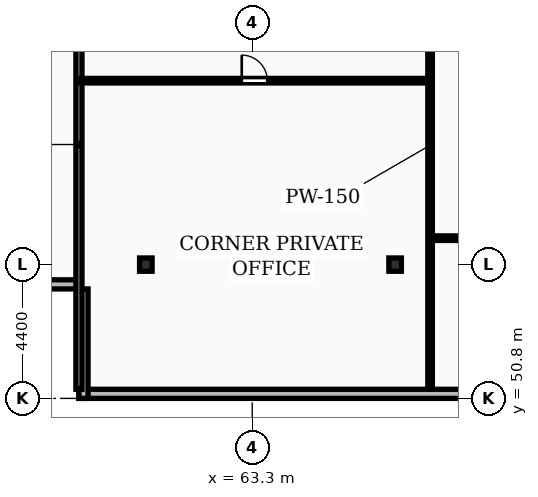
"""IFC4 building model, lengths in metres.
Left out: names, types, materials, properties, quantities, classifications, styles, units other than length and angle.
Written with IfcOpenShell. Run it as: python <this file> out.ifc"""

import sys

from ifc_helpers import new_model, si_unit, direction, frame, frame_2d, origin, origin_2d, place, context, subcontext, project, spatial, rectangle, i_section, extrude, element, fill, save


model = new_model("IFC4")
c1 = context("Model", 3, precision=1e-05, world=origin(), true_north=direction((0.0, 1.0)))
c2 = subcontext(c1, "Body", "Model", "MODEL_VIEW")
j1 = project(units=[si_unit("LENGTHUNIT", "METRE"), si_unit("PLANEANGLEUNIT", "RADIAN")], contexts=[c1])
p1 = place(None, origin())
s1 = spatial("IfcSite", under=j1, at=p1, CompositionType="ELEMENT")
p2 = place(p1, origin())
s2 = spatial("IfcBuilding", under=s1, at=p2, CompositionType="ELEMENT")
p3 = place(p2, frame((0.0, 0.0, 139.3)))
s3 = spatial("IfcBuildingStorey", under=s2, at=p3, CompositionType="ELEMENT", Elevation=139.3)
for number, where, z_axis, x_axis in (
    (1, (59.8, 55.2, 0.0), (0.0, 0.0, 1.0), (1.0, 0.0, 0.0)),
    (2, (68.0, 55.2, 0.0), (0.0, 0.0, 1.0), (1.0, 0.0, 0.0)),
):
    element("IfcColumn", number, at=place(p3, frame(where, z_axis=z_axis, x_axis=x_axis)), inside=s3, PredefinedType="COLUMN", context=c2, shape_type="SweptSolid", body=[
        extrude(i_section(OverallWidth=0.412, OverallDepth=0.437, WebThickness=0.036, FlangeThickness=0.052, FilletRadius=0.015, at=origin_2d()), origin(), (0.0, 0.0, 1.0), 3.6),
    ])
p4 = place(p3, frame((57.6, 50.95, 0.0), z_axis=(0.0, 0.0, 1.0), x_axis=(1.0, 0.0, 0.0)))
e3 = element("IfcWall", 3, at=p4, inside=s3, PredefinedType="STANDARD", context=c2, shape_type="SweptSolid", body=[
    extrude(rectangle(XDim=73.0, YDim=0.3, at=frame_2d((36.5, 0.0))), origin(), (0.0, 0.0, 1.0), 3.31),
])
p5 = place(p4, frame((15.225, 0.0, 0.85)))
e4 = element("IfcOpeningElement", 4, at=p5, cuts=e3, PredefinedType="OPENING", context=c2, shape_type="SweptSolid", body=[
    extrude(rectangle(XDim=1.8, YDim=1.8, at=frame_2d((0.9, 0.9))), frame((0.0, 0.16, 0.0), z_axis=(0.0, -1.0, 0.0), x_axis=(1.0, 0.0, 0.0)), (0.0, 0.0, 1.0), 0.32),
])
p6 = place(p4, frame((58.575, 0.0, 0.85)))
e5 = element("IfcOpeningElement", 5, at=p6, cuts=e3, PredefinedType="OPENING", context=c2, shape_type="SweptSolid", body=[
    extrude(rectangle(XDim=1.8, YDim=1.8, at=frame_2d((0.9, 0.9))), frame((0.0, 0.16, 0.0), z_axis=(0.0, -1.0, 0.0), x_axis=(1.0, 0.0, 0.0)), (0.0, 0.0, 1.0), 0.32),
])
p7 = place(p4, frame((33.45, 0.0, 0.0)))
e6 = element("IfcOpeningElement", 6, at=p7, cuts=e3, PredefinedType="OPENING", context=c2, shape_type="SweptSolid", body=[
    extrude(rectangle(XDim=1.1, YDim=2.1, at=frame_2d((0.55, 1.05))), frame((0.0, 0.16, 0.0), z_axis=(0.0, -1.0, 0.0), x_axis=(1.0, 0.0, 0.0)), (0.0, 0.0, 1.0), 0.32),
])
p8 = place(p3, frame((54.0, 54.55, 0.0), z_axis=(0.0, 0.0, 1.0), x_axis=(1.0, 0.0, 0.0)))
e7 = element("IfcWall", 7, at=p8, inside=s3, PredefinedType="STANDARD", context=c2, shape_type="SweptSolid", body=[
    extrude(rectangle(XDim=3.6, YDim=0.3, at=frame_2d((1.8, 0.0))), origin(), (0.0, 0.0, 1.0), 3.31),
])
p9 = place(p3, frame((57.75, 54.4, 0.0), z_axis=(0.0, 0.0, 1.0), x_axis=(0.0, -1.0, 0.0)))
e8 = element("IfcWall", 8, at=p9, inside=s3, PredefinedType="STANDARD", context=c2, shape_type="SweptSolid", body=[
    extrude(rectangle(XDim=3.6, YDim=0.3, at=frame_2d((1.8, 0.0))), origin(), (0.0, 0.0, 1.0), 3.31),
])
p10 = place(p3, frame((57.6, 51.1, 0.0), z_axis=(0.0, 0.0, 1.0), x_axis=(0.0, 1.0, 0.0)))
e9 = element("IfcWall", 9, at=p10, inside=s3, PredefinedType="PARTITIONING", context=c2, shape_type="SweptSolid", body=[
    extrude(rectangle(XDim=16.1, YDim=0.2, at=frame_2d((8.05, 0.0))), origin(), (0.0, 0.0, 1.0), 3.31),
])
p11 = place(p3, frame((57.6, 61.25, 0.0), z_axis=(0.0, 0.0, 1.0), x_axis=(1.0, 0.0, 0.0)))
e10 = element("IfcWall", 10, at=p11, inside=s3, PredefinedType="PARTITIONING", context=c2, shape_type="SweptSolid", body=[
    extrude(rectangle(XDim=11.55, YDim=0.15, at=frame_2d((5.775, 0.0))), origin(), (0.0, 0.0, 1.0), 3.31),
])
p12 = place(p11, frame((5.355, 0.0, 0.0)))
e11 = element("IfcOpeningElement", 11, at=p12, cuts=e10, PredefinedType="OPENING", context=c2, shape_type="SweptSolid", body=[
    extrude(rectangle(XDim=0.84, YDim=2.04, at=frame_2d((0.42, 1.02))), frame((0.0, 0.085, 0.0), z_axis=(0.0, -1.0, 0.0), x_axis=(1.0, 0.0, 0.0)), (0.0, 0.0, 1.0), 0.17),
])
p13 = place(p3, frame((69.15, 51.1, 0.0), z_axis=(0.0, 0.0, 1.0), x_axis=(0.0, 1.0, 0.0)))
e12 = element("IfcWall", 12, at=p13, inside=s3, PredefinedType="PARTITIONING", context=c2, shape_type="SweptSolid", body=[
    extrude(rectangle(XDim=16.05, YDim=0.15, at=frame_2d((8.025, 0.0))), origin(), (0.0, 0.0, 1.0), 3.31),
])
p14 = place(p13, frame((11.3, 0.0, 0.0)))
e13 = element("IfcOpeningElement", 13, at=p14, cuts=e12, PredefinedType="OPENING", context=c2, shape_type="SweptSolid", body=[
    extrude(rectangle(XDim=0.88, YDim=2.06, at=frame_2d((0.44, 1.03))), frame((0.0, 0.085, 0.0), z_axis=(0.0, -1.0, 0.0), x_axis=(1.0, 0.0, 0.0)), (0.0, 0.0, 1.0), 0.17),
])
p15 = place(p3, frame((69.17, 56.07, 0.0), z_axis=(0.0, 0.0, 1.0), x_axis=(1.0, 0.0, 0.0)))
e14 = element("IfcWall", 14, at=p15, inside=s3, PredefinedType="PARTITIONING", context=c2, shape_type="SweptSolid", body=[
    extrude(rectangle(XDim=6.76, YDim=0.15, at=frame_2d((3.38, 0.0))), origin(), (0.0, 0.0, 1.0), 3.31),
])
p16 = place(p15, frame((1.362, 0.0, 0.0)))
e15 = element("IfcOpeningElement", 15, at=p16, cuts=e14, PredefinedType="OPENING", context=c2, shape_type="SweptSolid", body=[
    extrude(rectangle(XDim=0.84, YDim=2.04, at=frame_2d((0.42, 1.02))), frame((0.0, 0.085, 0.0), z_axis=(0.0, -1.0, 0.0), x_axis=(1.0, 0.0, 0.0)), (0.0, 0.0, 1.0), 0.17),
])
p17 = place(p15, frame((4.277, 0.0, 0.0)))
e16 = element("IfcOpeningElement", 16, at=p17, cuts=e14, PredefinedType="OPENING", context=c2, shape_type="SweptSolid", body=[
    extrude(rectangle(XDim=0.88, YDim=2.06, at=frame_2d((0.44, 1.03))), frame((0.0, 0.085, 0.0), z_axis=(0.0, -1.0, 0.0), x_axis=(1.0, 0.0, 0.0)), (0.0, 0.0, 1.0), 0.17),
])
p18 = place(p12, origin())
e17 = element("IfcDoor", 17, at=p18, inside=s3, OperationType="SINGLE_SWING_LEFT", PredefinedType="DOOR", context=c2, shape_type="SweptSolid", body=[
    extrude(rectangle(XDim=0.84, YDim=2.04, at=frame_2d((0.42, 1.02))), frame((0.0, 0.025, 0.0), z_axis=(0.0, -1.0, 0.0), x_axis=(1.0, 0.0, 0.0)), (0.0, 0.0, 1.0), 0.05),
])
fill(e11, e17)
save(model, sys.argv[1])
